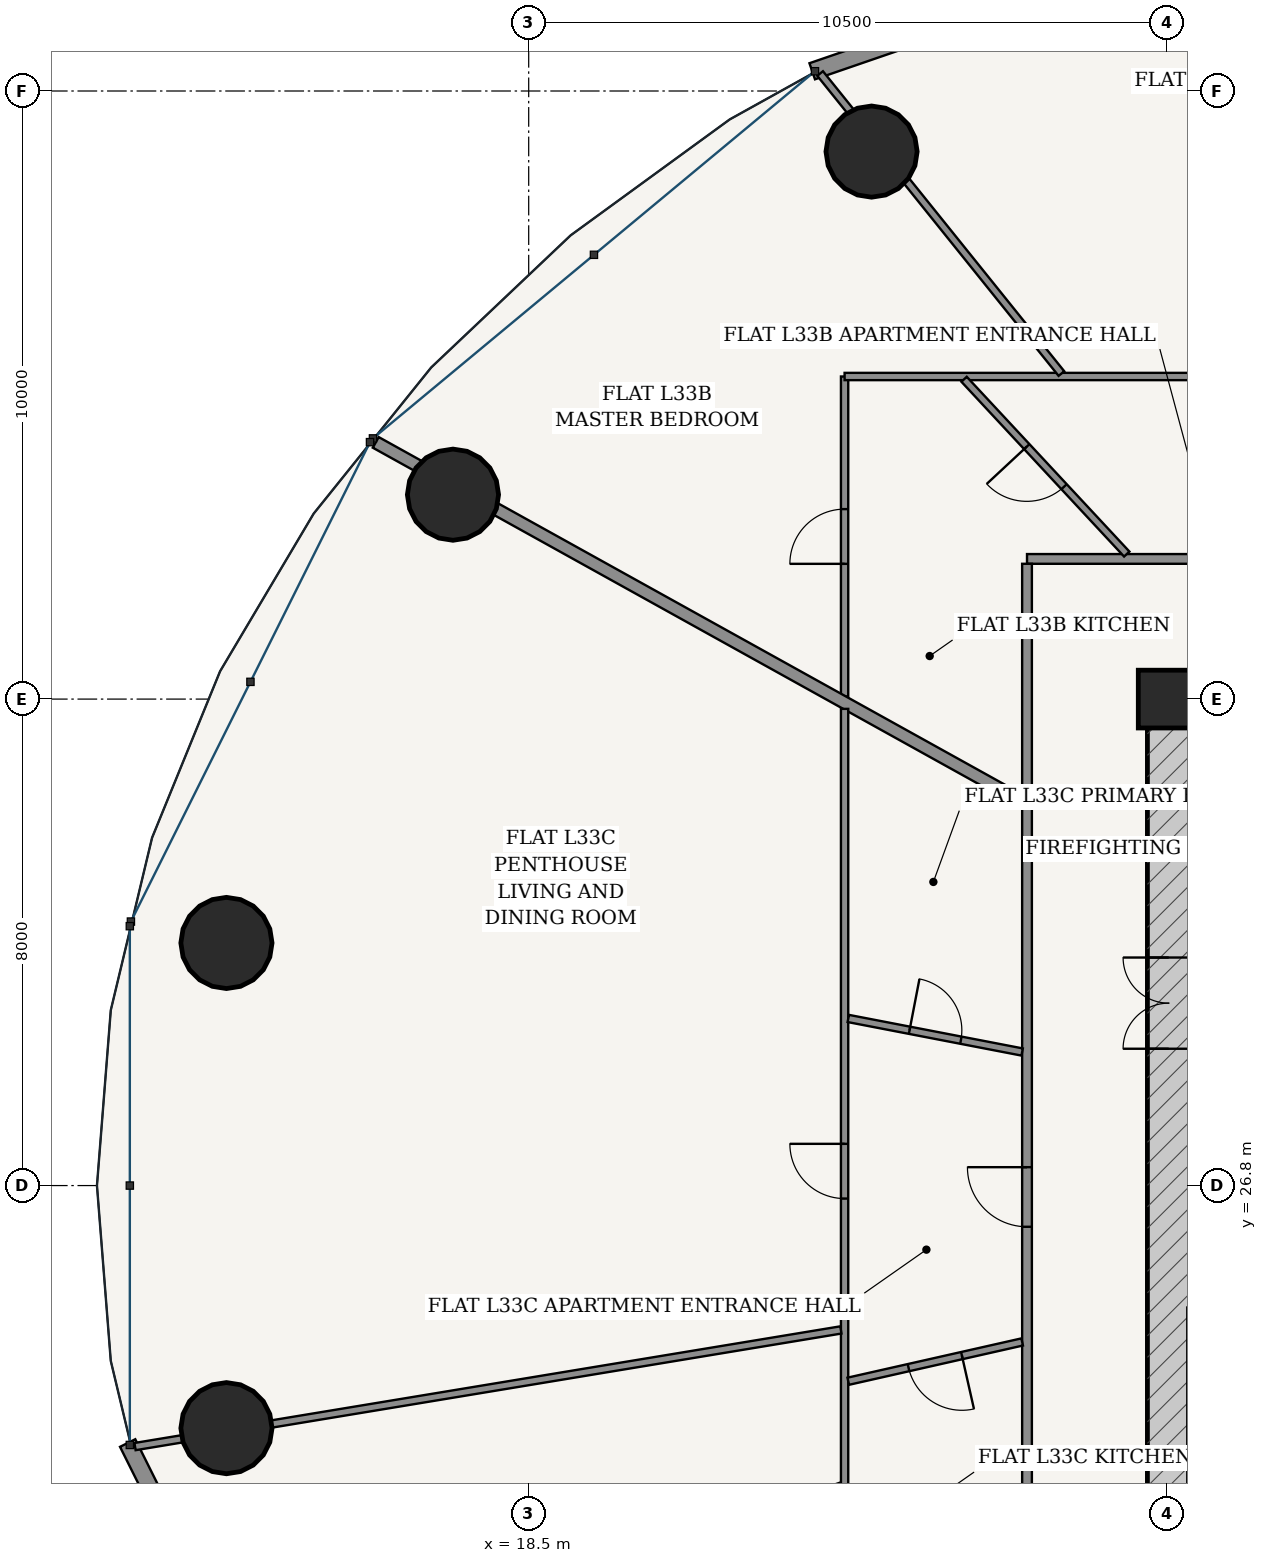
"""IFC4 building model, lengths in metres.
Left out: names, types, materials, properties, quantities, classifications, styles, units other than length and angle.
Written with IfcOpenShell. Run it as: python <this file> out.ifc"""

import sys

from ifc_helpers import new_model, si_unit, direction, frame, frame_2d, origin, origin_2d, place, context, subcontext, project, spatial, rectangle, hollow_circle, extrude, source, transform, mapped, element, fill, save


model = new_model("IFC4")
c1 = context("Model", 3, precision=1e-05, world=origin(), true_north=direction((-0.2419218956, 0.970295726276)))
c2 = subcontext(c1, "Body", "Model", "MODEL_VIEW")
j1 = project(units=[si_unit("LENGTHUNIT", "METRE"), si_unit("PLANEANGLEUNIT", "RADIAN")], contexts=[c1])
p1 = place(None, origin())
s1 = spatial("IfcSite", under=j1, at=p1, CompositionType="ELEMENT")
p2 = place(p1, origin())
s2 = spatial("IfcBuilding", under=s1, at=p2, CompositionType="ELEMENT")
p3 = place(p2, frame((0.0, 0.0, 126.6)))
s3 = spatial("IfcBuildingStorey", under=s2, at=p3, CompositionType="ELEMENT", Elevation=126.6)
p4 = place(p3, frame((29.0, 34.8, 0.0), z_axis=(0.0, 0.0, 1.0), x_axis=(1.0, 0.0, 0.0)))
e1 = element("IfcColumn", 1, at=p4, inside=s3, PredefinedType="COLUMN", context=c2, shape_type="SweptSolid", body=[
    extrude(rectangle(XDim=0.95, YDim=0.95, at=origin_2d()), origin(), (0.0, 0.0, 1.0), 3.6),
])
p5 = place(p3, frame((28.675, 34.775, 0.0), z_axis=(0.0, 0.0, 1.0), x_axis=(1.0, 0.0, 0.0)))
e2 = element("IfcWall", 2, at=p5, inside=s3, PredefinedType="SHEAR", context=c2, shape_type="SweptSolid", body=[
    extrude(rectangle(XDim=18.65, YDim=0.7, at=frame_2d((9.325, 0.0))), origin(), (0.0, 0.0, 1.0), 3.15),
])
p6 = place(p5, frame((8.9, 0.0, 0.0)))
e3 = element("IfcOpeningElement", 3, at=p6, cuts=e2, PredefinedType="OPENING", context=c2, shape_type="SweptSolid", body=[
    extrude(rectangle(XDim=0.85, YDim=2.1, at=frame_2d((0.425, 1.05))), frame((0.0, 0.36, 0.0), z_axis=(0.0, -1.0, 0.0), x_axis=(1.0, 0.0, 0.0)), (0.0, 0.0, 1.0), 0.72),
])
p7 = place(p3, frame((29.025, 19.175, 0.0), z_axis=(0.0, 0.0, 1.0), x_axis=(0.0, 1.0, 0.0)))
e4 = element("IfcWall", 4, at=p7, inside=s3, PredefinedType="SHEAR", context=c2, shape_type="SweptSolid", body=[
    extrude(rectangle(XDim=15.25, YDim=0.7, at=frame_2d((7.625, 0.0))), origin(), (0.0, 0.0, 1.0), 3.15),
])
p8 = place(p7, frame((9.875, 0.0, 0.0)))
e5 = element("IfcOpeningElement", 5, at=p8, cuts=e4, PredefinedType="OPENING", context=c2, shape_type="SweptSolid", body=[
    extrude(rectangle(XDim=1.5, YDim=2.2, at=frame_2d((0.75, 1.1))), frame((0.0, 0.36, 0.0), z_axis=(0.0, -1.0, 0.0), x_axis=(1.0, 0.0, 0.0)), (0.0, 0.0, 1.0), 0.72),
])
for number, where, z_axis, x_axis in (
    (6, (24.138, 43.803, 0.0), (0.0, 0.0, 1.0), (1.0, 0.0, 0.0)),
    (7, (17.255, 38.161, 0.0), (0.0, 0.0, 1.0), (1.0, 0.0, 0.0)),
    (8, (13.529, 30.79, 0.0), (0.0, 0.0, 1.0), (1.0, 0.0, 0.0)),
    (9, (13.529, 22.81, 0.0), (0.0, 0.0, 1.0), (1.0, 0.0, 0.0)),
):
    element("IfcColumn", number, at=place(p3, frame(where, z_axis=z_axis, x_axis=x_axis)), inside=s3, PredefinedType="COLUMN", context=c2, shape_type="SweptSolid", body=[
        extrude(hollow_circle(Radius=0.75, WallThickness=0.045, at=origin_2d()), origin(), (0.0, 0.0, 1.0), 3.6),
    ])
p9 = place(p3, frame((32.892, 48.472, 0.0), z_axis=(0.0, 0.0, 1.0), x_axis=(-0.945597432299, -0.325339047809, 0.0)))
e10 = element("IfcWall", 10, at=p9, inside=s3, PredefinedType="SOLIDWALL", context=c2, shape_type="SweptSolid", body=[
    extrude(rectangle(XDim=10.289, YDim=0.28, at=frame_2d((5.145, 0.0))), origin(), (0.0, 0.0, 1.0), 3.15),
])
p10 = place(p9, frame((1.728, 0.0, 0.85)))
e11 = element("IfcOpeningElement", 11, at=p10, cuts=e10, PredefinedType="OPENING", context=c2, shape_type="SweptSolid", body=[
    extrude(rectangle(XDim=2.1, YDim=1.95, at=frame_2d((1.05, 0.975))), frame((0.0, 0.15, 0.0), z_axis=(0.0, -1.0, 0.0), x_axis=(1.0, 0.0, 0.0)), (0.0, 0.0, 1.0), 0.3),
])
p11 = place(p9, frame((6.461, 0.0, 0.85)))
e12 = element("IfcOpeningElement", 12, at=p11, cuts=e10, PredefinedType="OPENING", context=c2, shape_type="SweptSolid", body=[
    extrude(rectangle(XDim=2.1, YDim=1.95, at=frame_2d((1.05, 0.975))), frame((0.0, 0.15, 0.0), z_axis=(0.0, -1.0, 0.0), x_axis=(1.0, 0.0, 0.0)), (0.0, 0.0, 1.0), 0.3),
])
p12 = place(p3, frame((11.905, 22.566, 0.0), z_axis=(0.0, 0.0, 1.0), x_axis=(0.446274562077, -0.894896091869, 0.0)))
e13 = element("IfcWall", 13, at=p12, inside=s3, PredefinedType="SOLIDWALL", context=c2, shape_type="SweptSolid", body=[
    extrude(rectangle(XDim=9.05, YDim=0.28, at=frame_2d((4.525, 0.0))), origin(), (0.0, 0.0, 1.0), 3.15),
])
p13 = place(p12, frame((1.394, 0.0, 0.85)))
e14 = element("IfcOpeningElement", 14, at=p13, cuts=e13, PredefinedType="OPENING", context=c2, shape_type="SweptSolid", body=[
    extrude(rectangle(XDim=2.1, YDim=1.95, at=frame_2d((1.05, 0.975))), frame((0.0, 0.15, 0.0), z_axis=(0.0, -1.0, 0.0), x_axis=(1.0, 0.0, 0.0)), (0.0, 0.0, 1.0), 0.3),
])
p14 = place(p12, frame((5.557, 0.0, 0.85)))
e15 = element("IfcOpeningElement", 15, at=p14, cuts=e13, PredefinedType="OPENING", context=c2, shape_type="SweptSolid", body=[
    extrude(rectangle(XDim=2.1, YDim=1.95, at=frame_2d((1.05, 0.975))), frame((0.0, 0.15, 0.0), z_axis=(0.0, -1.0, 0.0), x_axis=(1.0, 0.0, 0.0)), (0.0, 0.0, 1.0), 0.3),
])
p15 = place(p3, frame((26.695, 37.105, 0.0), z_axis=(0.0, 0.0, 1.0), x_axis=(1.0, 0.0, 0.0)))
e16 = element("IfcWall", 16, at=p15, inside=s3, PredefinedType="PARTITIONING", context=c2, shape_type="SweptSolid", body=[
    extrude(rectangle(XDim=22.61, YDim=0.16, at=frame_2d((11.305, 0.0))), origin(), (0.0, 0.0, 1.0), 2.596),
])
p16 = place(p15, frame((4.925, 0.0, 0.0)))
e17 = element("IfcOpeningElement", 17, at=p16, cuts=e16, PredefinedType="OPENING", context=c2, shape_type="SweptSolid", body=[
    extrude(rectangle(XDim=0.98, YDim=2.2, at=frame_2d((0.49, 1.1))), frame((0.0, 0.09, 0.0), z_axis=(0.0, -1.0, 0.0), x_axis=(1.0, 0.0, 0.0)), (0.0, 0.0, 1.0), 0.18),
])
p17 = place(p3, frame((26.695, 16.575, 0.0), z_axis=(0.0, 0.0, 1.0), x_axis=(0.0, 1.0, 0.0)))
e18 = element("IfcWall", 18, at=p17, inside=s3, PredefinedType="PARTITIONING", context=c2, shape_type="SweptSolid", body=[
    extrude(rectangle(XDim=20.45, YDim=0.16, at=frame_2d((10.225, 0.0))), origin(), (0.0, 0.0, 1.0), 2.596),
])
p18 = place(p17, frame((9.547, 0.0, 0.0)))
e19 = element("IfcOpeningElement", 19, at=p18, cuts=e18, PredefinedType="OPENING", context=c2, shape_type="SweptSolid", body=[
    extrude(rectangle(XDim=0.98, YDim=2.2, at=frame_2d((0.49, 1.1))), frame((0.0, 0.09, 0.0), z_axis=(0.0, -1.0, 0.0), x_axis=(1.0, 0.0, 0.0)), (0.0, 0.0, 1.0), 0.18),
])
p19 = place(p3, frame((23.695, 34.843, 0.0), z_axis=(0.0, 0.0, 1.0), x_axis=(0.0, 1.0, 0.0)))
e20 = element("IfcWall", 20, at=p19, inside=s3, PredefinedType="PARTITIONING", context=c2, shape_type="SweptSolid", body=[
    extrude(rectangle(XDim=5.262, YDim=0.12, at=frame_2d((2.631, 0.0))), origin(), (0.0, 0.0, 1.0), 2.596),
])
p20 = place(p19, frame((2.181, 0.0, 0.0)))
e21 = element("IfcOpeningElement", 21, at=p20, cuts=e20, PredefinedType="OPENING", context=c2, shape_type="SweptSolid", body=[
    extrude(rectangle(XDim=0.9, YDim=2.15, at=frame_2d((0.45, 1.075))), frame((0.0, 0.07, 0.0), z_axis=(0.0, -1.0, 0.0), x_axis=(1.0, 0.0, 0.0)), (0.0, 0.0, 1.0), 0.14),
])
p21 = place(p3, frame((23.695, 40.105, 0.0), z_axis=(0.0, 0.0, 1.0), x_axis=(1.0, 0.0, 0.0)))
e22 = element("IfcWall", 22, at=p21, inside=s3, PredefinedType="PARTITIONING", context=c2, shape_type="SweptSolid", body=[
    extrude(rectangle(XDim=17.388, YDim=0.12, at=frame_2d((8.694, 0.0))), origin(), (0.0, 0.0, 1.0), 2.596),
])
p22 = place(p21, frame((7.184, 0.0, 0.0)))
e23 = element("IfcOpeningElement", 23, at=p22, cuts=e22, PredefinedType="OPENING", context=c2, shape_type="SweptSolid", body=[
    extrude(rectangle(XDim=0.9, YDim=2.15, at=frame_2d((0.45, 1.075))), frame((0.0, 0.07, 0.0), z_axis=(0.0, -1.0, 0.0), x_axis=(1.0, 0.0, 0.0)), (0.0, 0.0, 1.0), 0.14),
])
p23 = place(p3, frame((27.261, 40.153, 0.0), z_axis=(0.0, 0.0, 1.0), x_axis=(-0.626714875168, 0.779248654309, 0.0)))
e24 = element("IfcWall", 24, at=p23, inside=s3, PredefinedType="PARTITIONING", context=c2, shape_type="SweptSolid", body=[
    extrude(rectangle(XDim=6.332, YDim=0.12, at=frame_2d((3.166, 0.0))), origin(), (0.0, 0.0, 1.0), 2.5),
])
p24 = place(p3, frame((28.335, 37.185, 0.0), z_axis=(0.0, 0.0, 1.0), x_axis=(-0.681251984121, 0.732048997083, 0.0)))
e25 = element("IfcWall", 25, at=p24, inside=s3, PredefinedType="PARTITIONING", context=c2, shape_type="SweptSolid", body=[
    extrude(rectangle(XDim=3.927, YDim=0.12, at=frame_2d((1.963, 0.0))), origin(), (0.0, 0.0, 1.0), 2.596),
])
p25 = place(p24, frame((1.513, 0.0, 0.0)))
e26 = element("IfcOpeningElement", 26, at=p25, cuts=e25, PredefinedType="OPENING", context=c2, shape_type="SweptSolid", body=[
    extrude(rectangle(XDim=0.9, YDim=2.15, at=frame_2d((0.45, 1.075))), frame((0.0, 0.07, 0.0), z_axis=(0.0, -1.0, 0.0), x_axis=(1.0, 0.0, 0.0)), (0.0, 0.0, 1.0), 0.14),
])
p26 = place(p3, frame((26.615, 33.12, 0.0), z_axis=(0.0, 0.0, 1.0), x_axis=(-0.874319192772, 0.485351366692, 0.0)))
e27 = element("IfcWall", 27, at=p26, inside=s3, PredefinedType="PARTITIONING", context=c2, shape_type="SweptSolid", body=[
    extrude(rectangle(XDim=12.158, YDim=0.2, at=frame_2d((6.079, 0.0))), origin(), (0.0, 0.0, 1.0), 2.5),
])
p27 = place(p3, frame((23.695, 18.961, 0.0), z_axis=(0.0, 0.0, 1.0), x_axis=(0.0, 1.0, 0.0)))
e28 = element("IfcWall", 28, at=p27, inside=s3, PredefinedType="PARTITIONING", context=c2, shape_type="SweptSolid", body=[
    extrude(rectangle(XDim=15.679, YDim=0.12, at=frame_2d((7.839, 0.0))), origin(), (0.0, 0.0, 1.0), 2.596),
])
p28 = place(p27, frame((7.625, 0.0, 0.0)))
e29 = element("IfcOpeningElement", 29, at=p28, cuts=e28, PredefinedType="OPENING", context=c2, shape_type="SweptSolid", body=[
    extrude(rectangle(XDim=0.9, YDim=2.15, at=frame_2d((0.45, 1.075))), frame((0.0, 0.07, 0.0), z_axis=(0.0, -1.0, 0.0), x_axis=(1.0, 0.0, 0.0)), (0.0, 0.0, 1.0), 0.14),
])
p29 = place(p27, frame((1.128, 0.0, 0.0)))
e30 = element("IfcOpeningElement", 30, at=p29, cuts=e28, PredefinedType="OPENING", context=c2, shape_type="SweptSolid", body=[
    extrude(rectangle(XDim=0.9, YDim=2.15, at=frame_2d((0.45, 1.075))), frame((0.0, 0.07, 0.0), z_axis=(0.0, -1.0, 0.0), x_axis=(1.0, 0.0, 0.0)), (0.0, 0.0, 1.0), 0.14),
])
p30 = place(p3, frame((23.634, 24.426, 0.0), z_axis=(0.0, 0.0, 1.0), x_axis=(-0.986619012175, -0.163042708564, 0.0)))
e31 = element("IfcWall", 31, at=p30, inside=s3, PredefinedType="PARTITIONING", context=c2, shape_type="SweptSolid", body=[
    extrude(rectangle(XDim=11.765, YDim=0.12, at=frame_2d((5.883, 0.0))), origin(), (0.0, 0.0, 1.0), 2.5),
])
p31 = place(p3, frame((23.636, 21.857, 0.0), z_axis=(0.0, 0.0, 1.0), x_axis=(-0.945571197348, -0.325415289661, 0.0)))
e32 = element("IfcWall", 32, at=p31, inside=s3, PredefinedType="PARTITIONING", context=c2, shape_type="SweptSolid", body=[
    extrude(rectangle(XDim=10.737, YDim=0.12, at=frame_2d((5.368, 0.0))), origin(), (0.0, 0.0, 1.0), 2.666),
])
p32 = place(p31, frame((4.918, 0.0, 0.0)))
e33 = element("IfcOpeningElement", 33, at=p32, cuts=e32, PredefinedType="OPENING", context=c2, shape_type="SweptSolid", body=[
    extrude(rectangle(XDim=0.9, YDim=2.15, at=frame_2d((0.45, 1.075))), frame((0.0, 0.07, 0.0), z_axis=(0.0, -1.0, 0.0), x_axis=(1.0, 0.0, 0.0)), (0.0, 0.0, 1.0), 0.14),
])
p33 = place(p3, frame((26.615, 28.996, 0.0), z_axis=(0.0, 0.0, 1.0), x_axis=(-0.98189924136, 0.189404012145, 0.0)))
e34 = element("IfcWall", 34, at=p33, inside=s3, PredefinedType="PARTITIONING", context=c2, shape_type="SweptSolid", body=[
    extrude(rectangle(XDim=2.912, YDim=0.12, at=frame_2d((1.456, 0.0))), origin(), (0.0, 0.0, 1.0), 3.15),
])
p34 = place(p33, frame((1.026, 0.0, 0.0)))
e35 = element("IfcOpeningElement", 35, at=p34, cuts=e34, PredefinedType="OPENING", context=c2, shape_type="SweptSolid", body=[
    extrude(rectangle(XDim=0.86, YDim=2.15, at=frame_2d((0.43, 1.075))), frame((0.0, 0.07, 0.0), z_axis=(0.0, -1.0, 0.0), x_axis=(1.0, 0.0, 0.0)), (0.0, 0.0, 1.0), 0.14),
])
p35 = place(p3, frame((26.615, 24.228, 0.0), z_axis=(0.0, 0.0, 1.0), x_axis=(-0.975420797165, -0.220350331196, 0.0)))
e36 = element("IfcWall", 36, at=p35, inside=s3, PredefinedType="PARTITIONING", context=c2, shape_type="SweptSolid", body=[
    extrude(rectangle(XDim=2.932, YDim=0.12, at=frame_2d((1.466, 0.0))), origin(), (0.0, 0.0, 1.0), 3.15),
])
p36 = place(p35, frame((1.016, 0.0, 0.0)))
e37 = element("IfcOpeningElement", 37, at=p36, cuts=e36, PredefinedType="OPENING", context=c2, shape_type="SweptSolid", body=[
    extrude(rectangle(XDim=0.9, YDim=2.15, at=frame_2d((0.45, 1.075))), frame((0.0, 0.07, 0.0), z_axis=(0.0, -1.0, 0.0), x_axis=(1.0, 0.0, 0.0)), (0.0, 0.0, 1.0), 0.14),
])
m1 = source(origin(), c2, "Body", "SweptSolid", [
    extrude(rectangle(XDim=1.5, YDim=2.2, at=frame_2d((0.75, 1.1))), frame((0.0, 0.025, 0.0), z_axis=(0.0, -1.0, 0.0), x_axis=(1.0, 0.0, 0.0)), (0.0, 0.0, 1.0), 0.05),
])
p37 = place(p8, origin())
e38 = element("IfcDoor", 38, at=p37, inside=s3, OperationType="DOUBLE_DOOR_SINGLE_SWING", PredefinedType="DOOR", context=c2, shape_type="MappedRepresentation", body=[
    mapped(m1, transform((0.0, 0.0, 0.0), scale=1.0)),
])
fill(e5, e38)
m2 = source(origin(), c2, "Body", "SweptSolid", [
    extrude(rectangle(XDim=0.9, YDim=2.15, at=frame_2d((0.45, 1.075))), frame((0.0, 0.025, 0.0), z_axis=(0.0, -1.0, 0.0), x_axis=(1.0, 0.0, 0.0)), (0.0, 0.0, 1.0), 0.05),
])
p38 = place(p25, origin())
e39 = element("IfcDoor", 39, at=p38, inside=s3, OperationType="SINGLE_SWING_RIGHT", PredefinedType="DOOR", context=c2, shape_type="MappedRepresentation", body=[
    mapped(m2, transform((0.0, 0.0, 0.0), scale=1.0)),
])
fill(e26, e39)
p39 = place(p20, origin())
e40 = element("IfcDoor", 40, at=p39, inside=s3, OperationType="SINGLE_SWING_LEFT", PredefinedType="DOOR", context=c2, shape_type="MappedRepresentation", body=[
    mapped(m2, transform((0.0, 0.0, 0.0), scale=1.0)),
])
fill(e21, e40)
m3 = source(origin(), c2, "Body", "SweptSolid", [
    extrude(rectangle(XDim=0.98, YDim=2.2, at=frame_2d((0.49, 1.1))), frame((0.0, 0.025, 0.0), z_axis=(0.0, -1.0, 0.0), x_axis=(1.0, 0.0, 0.0)), (0.0, 0.0, 1.0), 0.05),
])
p40 = place(p18, origin())
e41 = element("IfcDoor", 41, at=p40, inside=s3, OperationType="SINGLE_SWING_RIGHT", PredefinedType="DOOR", context=c2, shape_type="MappedRepresentation", body=[
    mapped(m3, transform((0.0, 0.0, 0.0), scale=1.0)),
])
fill(e19, e41)
m4 = source(origin(), c2, "Body", "SweptSolid", [
    extrude(rectangle(XDim=0.86, YDim=2.15, at=frame_2d((0.43, 1.075))), frame((0.0, 0.025, 0.0), z_axis=(0.0, -1.0, 0.0), x_axis=(1.0, 0.0, 0.0)), (0.0, 0.0, 1.0), 0.05),
])
p41 = place(p34, frame((0.86, 0.0, 0.0), z_axis=(0.0, 0.0, 1.0), x_axis=(-1.0, 0.0, 0.0)))
e42 = element("IfcDoor", 42, at=p41, inside=s3, OperationType="SINGLE_SWING_LEFT", PredefinedType="DOOR", context=c2, shape_type="MappedRepresentation", body=[
    mapped(m4, transform((0.0, 0.0, 0.0), scale=1.0)),
])
fill(e35, e42)
p42 = place(p28, origin())
e43 = element("IfcDoor", 43, at=p42, inside=s3, OperationType="SINGLE_SWING_RIGHT", PredefinedType="DOOR", context=c2, shape_type="MappedRepresentation", body=[
    mapped(m2, transform((0.0, 0.0, 0.0), scale=1.0)),
])
fill(e29, e43)
p43 = place(p36, origin())
e44 = element("IfcDoor", 44, at=p43, inside=s3, OperationType="SINGLE_SWING_LEFT", PredefinedType="DOOR", context=c2, shape_type="MappedRepresentation", body=[
    mapped(m2, transform((0.0, 0.0, 0.0), scale=1.0)),
])
fill(e37, e44)
save(model, sys.argv[1])
